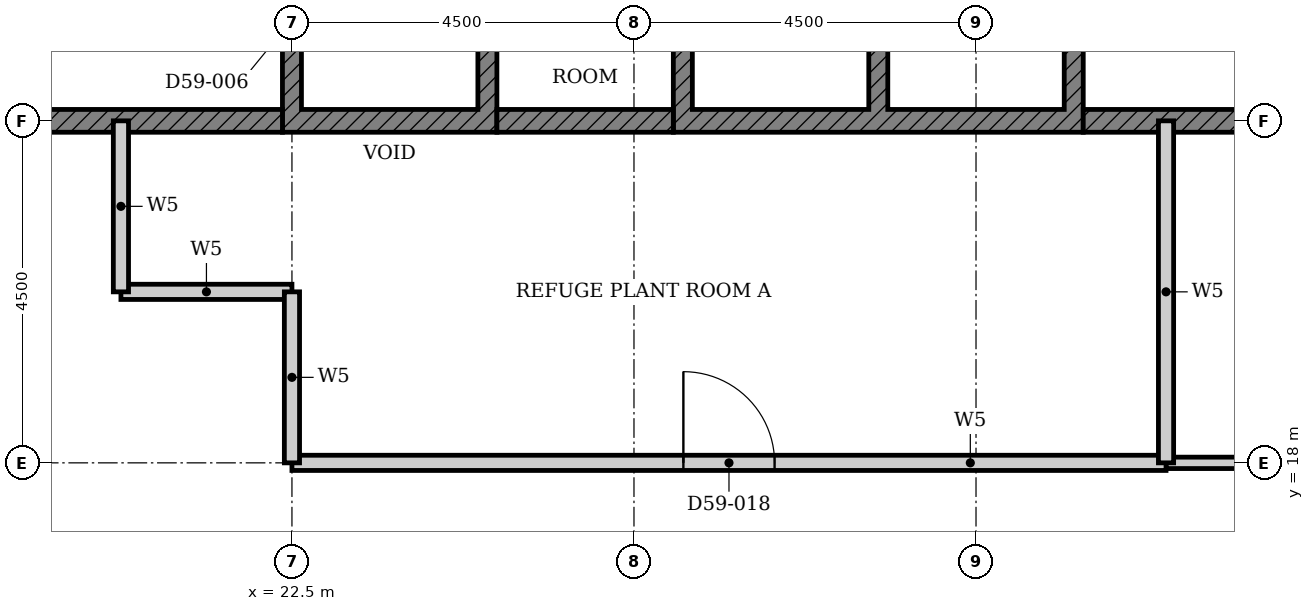
"""IFC4 building model, lengths in metres.
Left out: names, types, materials, properties, quantities, classifications, styles, units other than length and angle.
Written with IfcOpenShell. Run it as: python <this file> out.ifc"""

import sys

from ifc_helpers import new_model, si_unit, direction, frame, frame_2d, origin, place, context, subcontext, project, spatial, polyline, rectangle, outline, extrude, element, fill, save


model = new_model("IFC4")
c1 = context("Model", 3, precision=1e-05, world=origin(), true_north=direction((0.0, 1.0)))
c2 = subcontext(c1, "Body", "Model", "MODEL_VIEW")
j1 = project(units=[si_unit("LENGTHUNIT", "METRE"), si_unit("PLANEANGLEUNIT", "RADIAN")], contexts=[c1])
p1 = place(None, origin())
s1 = spatial("IfcSite", under=j1, at=p1, CompositionType="ELEMENT")
p2 = place(p1, origin())
s2 = spatial("IfcBuilding", under=s1, at=p2, CompositionType="ELEMENT")
p3 = place(p2, frame((0.0, 0.0, 233.1)))
s3 = spatial("IfcBuildingStorey", under=s2, at=p3, CompositionType="ELEMENT", Elevation=233.1)
p4 = place(p3, origin())
e1 = element("IfcWall", 1, at=p4, inside=s3, PredefinedType="SHEAR", context=c2, shape_type="SweptSolid", body=[
    extrude(outline(polyline([(22.375, 22.35), (25.197, 22.35), (25.197, 25.275), (24.947, 25.275), (24.947, 22.65), (22.625, 22.65), (22.625, 25.275), (22.375, 25.275), (22.375, 22.35)])), origin(), (0.0, 0.0, 1.0), 4.5),
])
p5 = place(p3, origin())
e2 = element("IfcWall", 2, at=p5, inside=s3, PredefinedType="SHEAR", context=c2, shape_type="SweptSolid", body=[
    extrude(outline(polyline([(27.518, 22.35), (32.911, 22.35), (32.911, 25.275), (32.661, 25.275), (32.661, 22.65), (30.339, 22.65), (30.339, 25.275), (30.089, 25.275), (30.089, 22.65), (27.768, 22.65), (27.768, 25.275), (27.518, 25.275), (27.518, 22.35)])), origin(), (0.0, 0.0, 1.0), 4.5),
])
p6 = place(p3, frame((18.15, 22.5, 0.0), z_axis=(0.0, 0.0, 1.0), x_axis=(1.0, 0.0, 0.0)))
e3 = element("IfcWall", 3, at=p6, inside=s3, PredefinedType="SHEAR", context=c2, shape_type="SweptSolid", body=[
    extrude(rectangle(XDim=4.225, YDim=0.3, at=frame_2d((2.113, 0.0))), origin(), (0.0, 0.0, 1.0), 4.5),
])
p7 = place(p3, frame((25.197, 22.5, 0.0), z_axis=(0.0, 0.0, 1.0), x_axis=(1.0, 0.0, 0.0)))
e4 = element("IfcWall", 4, at=p7, inside=s3, PredefinedType="SHEAR", context=c2, shape_type="SweptSolid", body=[
    extrude(rectangle(XDim=2.321, YDim=0.3, at=frame_2d((1.161, 0.0))), origin(), (0.0, 0.0, 1.0), 4.5),
])
p8 = place(p3, frame((32.911, 22.5, 0.0), z_axis=(0.0, 0.0, 1.0), x_axis=(1.0, 0.0, 0.0)))
e5 = element("IfcWall", 5, at=p8, inside=s3, PredefinedType="SHEAR", context=c2, shape_type="SweptSolid", body=[
    extrude(rectangle(XDim=11.939, YDim=0.3, at=frame_2d((5.97, 0.0))), origin(), (0.0, 0.0, 1.0), 4.5),
])
p9 = place(p8, frame((5.404, 0.0, 0.0)))
e6 = element("IfcOpeningElement", 6, at=p9, cuts=e5, PredefinedType="OPENING", context=c2, shape_type="SweptSolid", body=[
    extrude(rectangle(XDim=1.8, YDim=2.1, at=frame_2d((0.9, 1.05))), frame((0.0, 0.16, 0.0), z_axis=(0.0, -1.0, 0.0), x_axis=(1.0, 0.0, 0.0)), (0.0, 0.0, 1.0), 0.32),
])
p10 = place(p3, frame((34.0, 18.0, 0.0), z_axis=(0.0, 0.0, 1.0), x_axis=(1.0, 0.0, 0.0)))
e7 = element("IfcWall", 7, at=p10, inside=s3, PredefinedType="PARTITIONING", context=c2, shape_type="SweptSolid", body=[
    extrude(rectangle(XDim=4.0, YDim=0.15, at=frame_2d((2.0, 0.0))), origin(), (0.0, 0.0, 1.0), 4.5),
])
p11 = place(p3, frame((22.5, 18.0, 0.0), z_axis=(0.0, 0.0, 1.0), x_axis=(1.0, 0.0, 0.0)))
e8 = element("IfcWall", 8, at=p11, inside=s3, PredefinedType="PARTITIONING", context=c2, shape_type="SweptSolid", body=[
    extrude(rectangle(XDim=11.5, YDim=0.2, at=frame_2d((5.75, 0.0))), origin(), (0.0, 0.0, 1.0), 4.5),
])
p12 = place(p11, frame((5.15, 0.0, 0.0)))
e9 = element("IfcOpeningElement", 9, at=p12, cuts=e8, PredefinedType="OPENING", context=c2, shape_type="SweptSolid", body=[
    extrude(rectangle(XDim=1.2, YDim=2.1, at=frame_2d((0.6, 1.05))), frame((0.0, 0.11, 0.0), z_axis=(0.0, -1.0, 0.0), x_axis=(1.0, 0.0, 0.0)), (0.0, 0.0, 1.0), 0.22),
])
for number, where, z_axis, x_axis in (
    (10, (20.25, 20.25, 0.0), (0.0, 0.0, 1.0), (1.0, 0.0, 0.0)),
    (11, (20.25, 20.25, 0.0), (0.0, 0.0, 1.0), (0.0, 1.0, 0.0)),
    (12, (22.5, 18.0, 0.0), (0.0, 0.0, 1.0), (0.0, 1.0, 0.0)),
):
    element("IfcWall", number, at=place(p3, frame(where, z_axis=z_axis, x_axis=x_axis)), inside=s3, PredefinedType="PARTITIONING", context=c2, shape_type="SweptSolid", body=[
        extrude(rectangle(XDim=2.25, YDim=0.2, at=frame_2d((1.125, 0.0))), origin(), (0.0, 0.0, 1.0), 4.5),
    ])
p13 = place(p3, frame((34.0, 18.0, 0.0), z_axis=(0.0, 0.0, 1.0), x_axis=(0.0, 1.0, 0.0)))
e13 = element("IfcWall", 13, at=p13, inside=s3, PredefinedType="PARTITIONING", context=c2, shape_type="SweptSolid", body=[
    extrude(rectangle(XDim=4.5, YDim=0.2, at=frame_2d((2.25, 0.0))), origin(), (0.0, 0.0, 1.0), 4.5),
])
p14 = place(p12, origin())
e14 = element("IfcDoor", 14, at=p14, inside=s3, OperationType="SINGLE_SWING_RIGHT", PredefinedType="DOOR", context=c2, shape_type="SweptSolid", body=[
    extrude(rectangle(XDim=1.2, YDim=2.1, at=frame_2d((0.6, 1.05))), frame((0.0, 0.025, 0.0), z_axis=(0.0, -1.0, 0.0), x_axis=(1.0, 0.0, 0.0)), (0.0, 0.0, 1.0), 0.05),
])
fill(e9, e14)
save(model, sys.argv[1])
